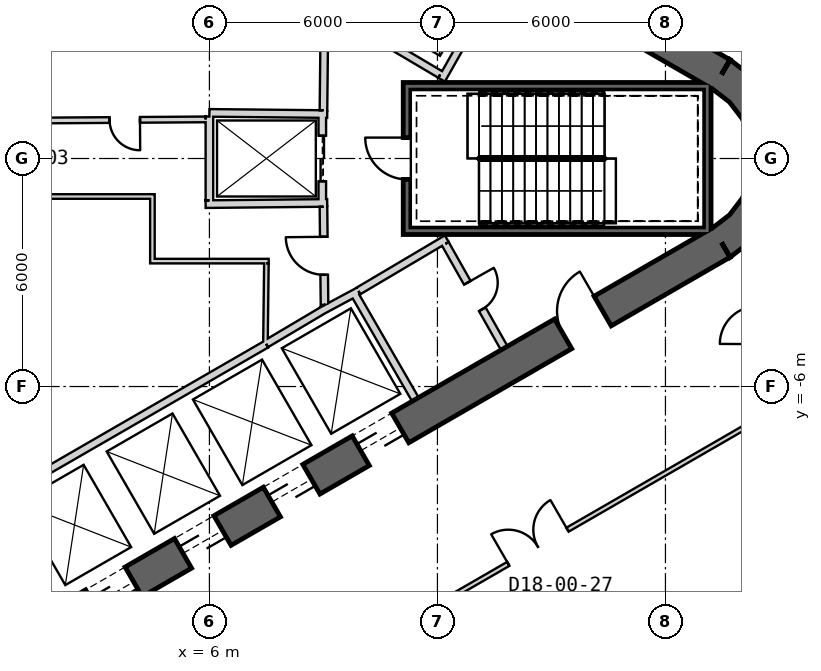
"""IFC4 building model, lengths in metres.
Left out: names, types, materials, properties, quantities, classifications, styles, units other than length and angle.
Written with IfcOpenShell. Run it as: python <this file> out.ifc"""

import sys

from ifc_helpers import new_model, si_unit, direction, frame, frame_2d, origin, place, context, subcontext, project, spatial, polyline, rectangle, outline, extrude, element, fill, save


model = new_model("IFC4")
c1 = context("Model", 3, precision=1e-05, world=origin(), true_north=direction((0.0, 1.0)))
c2 = subcontext(c1, "Body", "Model", "MODEL_VIEW")
j1 = project(units=[si_unit("LENGTHUNIT", "METRE"), si_unit("PLANEANGLEUNIT", "RADIAN")], contexts=[c1])
p1 = place(None, origin())
s1 = spatial("IfcSite", under=j1, at=p1, CompositionType="ELEMENT")
p2 = place(p1, origin())
s2 = spatial("IfcBuilding", under=s1, at=p2, CompositionType="ELEMENT")
p3 = place(p2, origin())
s3 = spatial("IfcBuildingStorey", under=s2, at=p3, CompositionType="ELEMENT", Elevation=0.0)
p4 = place(p3, frame((19.475, 2.208, 0.0), z_axis=(0.0, 0.0, 1.0), x_axis=(-0.866028369851, 0.499994862586, 0.0)))
e1 = element("IfcWall", 1, at=p4, inside=s3, PredefinedType="SHEAR", context=c2, shape_type="SweptSolid", body=[
    extrude(rectangle(XDim=31.523, YDim=0.9, at=frame_2d((15.762, 0.0))), origin(), (0.0, 0.0, 1.0), 9.0),
])
p5 = place(p4, frame((7.062, 0.0, 0.0)))
e2 = element("IfcOpeningElement", 2, at=p5, cuts=e1, PredefinedType="OPENING", context=c2, shape_type="SweptSolid", body=[
    extrude(rectangle(XDim=1.2, YDim=2.4, at=frame_2d((0.6, 1.2))), frame((0.0, 0.46, 0.0), z_axis=(0.0, -1.0, 0.0), x_axis=(1.0, 0.0, 0.0)), (0.0, 0.0, 1.0), 0.92),
])
p6 = place(p4, frame((9.762, 0.0, 0.0)))
e3 = element("IfcOpeningElement", 3, at=p6, cuts=e1, PredefinedType="OPENING", context=c2, shape_type="SweptSolid", body=[
    extrude(rectangle(XDim=1.2, YDim=2.4, at=frame_2d((0.6, 1.2))), frame((0.0, 0.46, 0.0), z_axis=(0.0, -1.0, 0.0), x_axis=(1.0, 0.0, 0.0)), (0.0, 0.0, 1.0), 0.92),
])
p7 = place(p4, frame((12.462, 0.0, 0.0)))
e4 = element("IfcOpeningElement", 4, at=p7, cuts=e1, PredefinedType="OPENING", context=c2, shape_type="SweptSolid", body=[
    extrude(rectangle(XDim=1.2, YDim=2.4, at=frame_2d((0.6, 1.2))), frame((0.0, 0.46, 0.0), z_axis=(0.0, -1.0, 0.0), x_axis=(1.0, 0.0, 0.0)), (0.0, 0.0, 1.0), 0.92),
])
p8 = place(p4, frame((15.162, 0.0, 0.0)))
e5 = element("IfcOpeningElement", 5, at=p8, cuts=e1, PredefinedType="OPENING", context=c2, shape_type="SweptSolid", body=[
    extrude(rectangle(XDim=1.2, YDim=2.4, at=frame_2d((0.6, 1.2))), frame((0.0, 0.46, 0.0), z_axis=(0.0, -1.0, 0.0), x_axis=(1.0, 0.0, 0.0)), (0.0, 0.0, 1.0), 0.92),
])
p9 = place(p4, frame((17.862, 0.0, 0.0)))
e6 = element("IfcOpeningElement", 6, at=p9, cuts=e1, PredefinedType="OPENING", context=c2, shape_type="SweptSolid", body=[
    extrude(rectangle(XDim=1.2, YDim=2.4, at=frame_2d((0.6, 1.2))), frame((0.0, 0.46, 0.0), z_axis=(0.0, -1.0, 0.0), x_axis=(1.0, 0.0, 0.0)), (0.0, 0.0, 1.0), 0.92),
])
p10 = place(p4, frame((20.562, 0.0, 0.0)))
e7 = element("IfcOpeningElement", 7, at=p10, cuts=e1, PredefinedType="OPENING", context=c2, shape_type="SweptSolid", body=[
    extrude(rectangle(XDim=1.2, YDim=2.4, at=frame_2d((0.6, 1.2))), frame((0.0, 0.46, 0.0), z_axis=(0.0, -1.0, 0.0), x_axis=(1.0, 0.0, 0.0)), (0.0, 0.0, 1.0), 0.92),
])
p11 = place(p4, frame((23.262, 0.0, 0.0)))
e8 = element("IfcOpeningElement", 8, at=p11, cuts=e1, PredefinedType="OPENING", context=c2, shape_type="SweptSolid", body=[
    extrude(rectangle(XDim=1.2, YDim=2.4, at=frame_2d((0.6, 1.2))), frame((0.0, 0.46, 0.0), z_axis=(0.0, -1.0, 0.0), x_axis=(1.0, 0.0, 0.0)), (0.0, 0.0, 1.0), 0.92),
])
p12 = place(p4, frame((3.612, 0.0, 0.0)))
e9 = element("IfcOpeningElement", 9, at=p12, cuts=e1, PredefinedType="OPENING", context=c2, shape_type="SweptSolid", body=[
    extrude(rectangle(XDim=1.2, YDim=2.4, at=frame_2d((0.6, 1.2))), frame((0.0, 0.46, 0.0), z_axis=(0.0, -1.0, 0.0), x_axis=(1.0, 0.0, 0.0)), (0.0, 0.0, 1.0), 0.92),
])
p13 = place(p4, frame((26.712, 0.0, 0.0)))
e10 = element("IfcOpeningElement", 10, at=p13, cuts=e1, PredefinedType="OPENING", context=c2, shape_type="SweptSolid", body=[
    extrude(rectangle(XDim=1.2, YDim=2.4, at=frame_2d((0.6, 1.2))), frame((0.0, 0.46, 0.0), z_axis=(0.0, -1.0, 0.0), x_axis=(1.0, 0.0, 0.0)), (0.0, 0.0, 1.0), 0.92),
])
p14 = place(p3, frame((-7.825, -17.97, 0.0), z_axis=(0.0, 0.0, 1.0), x_axis=(0.866028369851, 0.499994862586, 0.0)))
e11 = element("IfcWall", 11, at=p14, inside=s3, PredefinedType="SHEAR", context=c2, shape_type="SweptSolid", body=[
    extrude(rectangle(XDim=31.523, YDim=0.9, at=frame_2d((15.762, 0.0))), origin(), (0.0, 0.0, 1.0), 9.0),
])
p15 = place(p14, frame((7.062, 0.0, 0.0)))
e12 = element("IfcOpeningElement", 12, at=p15, cuts=e11, PredefinedType="OPENING", context=c2, shape_type="SweptSolid", body=[
    extrude(rectangle(XDim=1.2, YDim=2.4, at=frame_2d((0.6, 1.2))), frame((0.0, 0.46, 0.0), z_axis=(0.0, -1.0, 0.0), x_axis=(1.0, 0.0, 0.0)), (0.0, 0.0, 1.0), 0.92),
])
p16 = place(p14, frame((9.762, 0.0, 0.0)))
e13 = element("IfcOpeningElement", 13, at=p16, cuts=e11, PredefinedType="OPENING", context=c2, shape_type="SweptSolid", body=[
    extrude(rectangle(XDim=1.2, YDim=2.4, at=frame_2d((0.6, 1.2))), frame((0.0, 0.46, 0.0), z_axis=(0.0, -1.0, 0.0), x_axis=(1.0, 0.0, 0.0)), (0.0, 0.0, 1.0), 0.92),
])
p17 = place(p14, frame((12.462, 0.0, 0.0)))
e14 = element("IfcOpeningElement", 14, at=p17, cuts=e11, PredefinedType="OPENING", context=c2, shape_type="SweptSolid", body=[
    extrude(rectangle(XDim=1.2, YDim=2.4, at=frame_2d((0.6, 1.2))), frame((0.0, 0.46, 0.0), z_axis=(0.0, -1.0, 0.0), x_axis=(1.0, 0.0, 0.0)), (0.0, 0.0, 1.0), 0.92),
])
p18 = place(p14, frame((15.162, 0.0, 0.0)))
e15 = element("IfcOpeningElement", 15, at=p18, cuts=e11, PredefinedType="OPENING", context=c2, shape_type="SweptSolid", body=[
    extrude(rectangle(XDim=1.2, YDim=2.4, at=frame_2d((0.6, 1.2))), frame((0.0, 0.46, 0.0), z_axis=(0.0, -1.0, 0.0), x_axis=(1.0, 0.0, 0.0)), (0.0, 0.0, 1.0), 0.92),
])
p19 = place(p14, frame((17.862, 0.0, 0.0)))
e16 = element("IfcOpeningElement", 16, at=p19, cuts=e11, PredefinedType="OPENING", context=c2, shape_type="SweptSolid", body=[
    extrude(rectangle(XDim=1.2, YDim=2.4, at=frame_2d((0.6, 1.2))), frame((0.0, 0.46, 0.0), z_axis=(0.0, -1.0, 0.0), x_axis=(1.0, 0.0, 0.0)), (0.0, 0.0, 1.0), 0.92),
])
p20 = place(p14, frame((20.562, 0.0, 0.0)))
e17 = element("IfcOpeningElement", 17, at=p20, cuts=e11, PredefinedType="OPENING", context=c2, shape_type="SweptSolid", body=[
    extrude(rectangle(XDim=1.2, YDim=2.4, at=frame_2d((0.6, 1.2))), frame((0.0, 0.46, 0.0), z_axis=(0.0, -1.0, 0.0), x_axis=(1.0, 0.0, 0.0)), (0.0, 0.0, 1.0), 0.92),
])
p21 = place(p14, frame((26.712, 0.0, 0.0)))
e18 = element("IfcOpeningElement", 18, at=p21, cuts=e11, PredefinedType="OPENING", context=c2, shape_type="SweptSolid", body=[
    extrude(rectangle(XDim=1.2, YDim=2.4, at=frame_2d((0.6, 1.2))), frame((0.0, 0.46, 0.0), z_axis=(0.0, -1.0, 0.0), x_axis=(1.0, 0.0, 0.0)), (0.0, 0.0, 1.0), 0.92),
])
p22 = place(p14, frame((3.612, 0.0, 0.0)))
e19 = element("IfcOpeningElement", 19, at=p22, cuts=e11, PredefinedType="OPENING", context=c2, shape_type="SweptSolid", body=[
    extrude(rectangle(XDim=1.2, YDim=2.4, at=frame_2d((0.6, 1.2))), frame((0.0, 0.46, 0.0), z_axis=(0.0, -1.0, 0.0), x_axis=(1.0, 0.0, 0.0)), (0.0, 0.0, 1.0), 0.92),
])
p23 = place(p3, origin())
e20 = element("IfcWall", 20, at=p23, inside=s3, PredefinedType="SHEAR", context=c2, shape_type="SweptSolid", body=[
    extrude(outline(polyline([(19.7, -2.598), (20.321, -2.121), (20.798, -1.5), (21.098, -0.777), (21.2, 0.0), (21.098, 0.777), (20.798, 1.5), (20.321, 2.121), (19.7, 2.598), (19.25, 1.819), (19.685, 1.485), (20.019, 1.05), (20.229, 0.543), (20.3, 0.0), (20.229, -0.543), (20.019, -1.05), (19.685, -1.485), (19.25, -1.819), (19.7, -2.598)])), origin(), (0.0, 0.0, 1.0), 9.0),
])
p24 = place(p3, frame((12.11, 2.073, 0.0), z_axis=(0.0, 0.0, 1.0), x_axis=(0.49196600604, 0.870614408852, 0.0)))
e21 = element("IfcWall", 21, at=p24, inside=s3, PredefinedType="PLUMBINGWALL", context=c2, shape_type="SweptSolid", body=[
    extrude(rectangle(XDim=3.35, YDim=0.2, at=frame_2d((1.675, 0.0))), origin(), (0.0, 0.0, 1.0), 8.7),
])
p25 = place(p3, frame((12.073, 2.211, 0.0), z_axis=(0.0, 0.0, 1.0), x_axis=(-0.860438357912, 0.509554542943, 0.0)))
e22 = element("IfcWall", 22, at=p25, inside=s3, PredefinedType="PLUMBINGWALL", context=c2, shape_type="SweptSolid", body=[
    extrude(rectangle(XDim=2.7, YDim=0.2, at=frame_2d((1.35, 0.0))), origin(), (0.0, 0.0, 1.0), 8.7),
])
p26 = place(p3, frame((0.483, -8.936, 0.0), z_axis=(0.0, 0.0, 1.0), x_axis=(0.866030989016, 0.499990325971, 0.0)))
e23 = element("IfcWall", 23, at=p26, inside=s3, PredefinedType="PLUMBINGWALL", context=c2, shape_type="SweptSolid", body=[
    extrude(rectangle(XDim=8.1, YDim=0.2, at=frame_2d((4.05, 0.0))), origin(), (0.0, 0.0, 1.0), 8.7),
])
p27 = place(p3, frame((9.795, -3.525, 0.0), z_axis=(0.0, 0.0, 1.0), x_axis=(0.499984717929, -0.866034226713, 0.0)))
e24 = element("IfcWall", 24, at=p27, inside=s3, PredefinedType="PLUMBINGWALL", context=c2, shape_type="SweptSolid", body=[
    extrude(rectangle(XDim=3.25, YDim=0.2, at=frame_2d((1.625, 0.0))), origin(), (0.0, 0.0, 1.0), 8.7),
])
p28 = place(p3, frame((8.974, -3.999, 0.0), z_axis=(0.0, 0.0, 1.0), x_axis=(0.880907015104, 0.473289373154, 0.0)))
e25 = element("IfcWall", 25, at=p28, inside=s3, PredefinedType="PLUMBINGWALL", context=c2, shape_type="SweptSolid", body=[
    extrude(rectangle(XDim=1.078, YDim=0.2, at=frame_2d((0.539, 0.0))), origin(), (0.0, 0.0, 1.0), 8.7),
])
p29 = place(p3, frame((7.493, -4.878, 0.0), z_axis=(0.0, 0.0, 1.0), x_axis=(0.859981807212, 0.510324691999, 0.0)))
e26 = element("IfcWall", 26, at=p29, inside=s3, PredefinedType="PLUMBINGWALL", context=c2, shape_type="SweptSolid", body=[
    extrude(rectangle(XDim=1.845, YDim=0.2, at=frame_2d((0.922, 0.0))), origin(), (0.0, 0.0, 1.0), 8.7),
])
p30 = place(p3, frame((19.2, 1.9, -0.4), z_axis=(0.0, 0.0, 1.0), x_axis=(-1.0, 0.0, 0.0)))
e27 = element("IfcWall", 27, at=p30, inside=s3, PredefinedType="SHEAR", context=c2, shape_type="SweptSolid", body=[
    extrude(rectangle(XDim=8.1, YDim=0.2, at=frame_2d((4.05, 0.0))), origin(), (0.0, 0.0, 1.0), 9.1),
])
p31 = place(p3, frame((19.1, -2.0, -0.4), z_axis=(0.0, 0.0, 1.0), x_axis=(0.0, 1.0, 0.0)))
e28 = element("IfcWall", 28, at=p31, inside=s3, PredefinedType="SHEAR", context=c2, shape_type="SweptSolid", body=[
    extrude(rectangle(XDim=3.8, YDim=0.2, at=frame_2d((1.9, 0.0))), origin(), (0.0, 0.0, 1.0), 9.1),
])
p32 = place(p3, frame((11.1, -1.9, -0.4), z_axis=(0.0, 0.0, 1.0), x_axis=(1.0, 0.0, 0.0)))
e29 = element("IfcWall", 29, at=p32, inside=s3, PredefinedType="SHEAR", context=c2, shape_type="SweptSolid", body=[
    extrude(rectangle(XDim=7.9, YDim=0.2, at=frame_2d((3.95, 0.0))), origin(), (0.0, 0.0, 1.0), 9.1),
])
p33 = place(p3, frame((11.2, -1.8, -0.4), z_axis=(0.0, 0.0, 1.0), x_axis=(0.0, 1.0, 0.0)))
e30 = element("IfcWall", 30, at=p33, inside=s3, PredefinedType="SHEAR", context=c2, shape_type="SweptSolid", body=[
    extrude(rectangle(XDim=3.6, YDim=0.2, at=frame_2d((1.8, 0.0))), origin(), (0.0, 0.0, 1.0), 9.1),
])
p34 = place(p33, frame((1.25, 0.0, 0.4)))
e31 = element("IfcOpeningElement", 31, at=p34, cuts=e30, PredefinedType="OPENING", context=c2, shape_type="SweptSolid", body=[
    extrude(rectangle(XDim=1.1, YDim=2.1, at=frame_2d((0.55, 1.05))), frame((0.0, 0.11, 0.0), z_axis=(0.0, -1.0, 0.0), x_axis=(1.0, 0.0, 0.0)), (0.0, 0.0, 1.0), 0.22),
])
p35 = place(p3, frame((8.97, 1.2, 0.0), z_axis=(0.0, 0.0, 1.0), x_axis=(0.0, -1.0, 0.0)))
e32 = element("IfcWall", 32, at=p35, inside=s3, PredefinedType="PLUMBINGWALL", context=c2, shape_type="SweptSolid", body=[
    extrude(rectangle(XDim=2.4, YDim=0.2, at=frame_2d((1.2, 0.0))), origin(), (0.0, 0.0, 1.0), 8.7),
])
p36 = place(p35, frame((0.6, 0.0, 0.0)))
e33 = element("IfcOpeningElement", 33, at=p36, cuts=e32, PredefinedType="OPENING", context=c2, shape_type="SweptSolid", body=[
    extrude(rectangle(XDim=1.2, YDim=2.4, at=frame_2d((0.6, 1.2))), frame((0.0, 0.11, 0.0), z_axis=(0.0, -1.0, 0.0), x_axis=(1.0, 0.0, 0.0)), (0.0, 0.0, 1.0), 0.22),
])
p37 = place(p3, frame((6.0, 1.2, 0.0), z_axis=(0.0, 0.0, 1.0), x_axis=(0.999949988, -0.010001074852, 0.0)))
e34 = element("IfcWall", 34, at=p37, inside=s3, PredefinedType="PLUMBINGWALL", context=c2, shape_type="SweptSolid", body=[
    extrude(rectangle(XDim=3.1, YDim=0.2, at=frame_2d((1.55, 0.0))), origin(), (0.0, 0.0, 1.0), 8.7),
])
p38 = place(p3, frame((5.9, -1.201, 0.0), z_axis=(0.0, 0.0, 1.0), x_axis=(0.999950064753, 0.009993397809, 0.0)))
e35 = element("IfcWall", 35, at=p38, inside=s3, PredefinedType="PLUMBINGWALL", context=c2, shape_type="SweptSolid", body=[
    extrude(rectangle(XDim=3.2, YDim=0.2, at=frame_2d((1.6, 0.0))), origin(), (0.0, 0.0, 1.0), 8.7),
])
p39 = place(p3, frame((6.0, -1.1, 0.0), z_axis=(0.0, 0.0, 1.0), x_axis=(0.0, 1.0, 0.0)))
e36 = element("IfcWall", 36, at=p39, inside=s3, PredefinedType="PLUMBINGWALL", context=c2, shape_type="SweptSolid", body=[
    extrude(rectangle(XDim=2.205, YDim=0.2, at=frame_2d((1.102, 0.0))), origin(), (0.0, 0.0, 1.0), 8.7),
])
p40 = place(p3, frame((12.245, -2.109, 0.0), z_axis=(0.0, 0.0, 1.0), x_axis=(-0.860414880418, -0.509594185166, 0.0)))
e37 = element("IfcWall", 37, at=p40, inside=s3, PredefinedType="PARTITIONING", context=c2, shape_type="SweptSolid", body=[
    extrude(rectangle(XDim=2.7, YDim=0.2, at=frame_2d((1.35, 0.0))), origin(), (0.0, 0.0, 1.0), 8.7),
])
p41 = place(p3, frame((13.758, -4.99, 0.0), z_axis=(0.0, 0.0, 1.0), x_axis=(-0.491993409184, 0.87059892334, 0.0)))
e38 = element("IfcWall", 38, at=p41, inside=s3, PredefinedType="PARTITIONING", context=c2, shape_type="SweptSolid", body=[
    extrude(rectangle(XDim=3.15, YDim=0.2, at=frame_2d((1.575, 0.0))), origin(), (0.0, 0.0, 1.0), 8.7),
])
p42 = place(p41, frame((1.175, 0.0, 0.0)))
e39 = element("IfcOpeningElement", 39, at=p42, cuts=e38, PredefinedType="OPENING", context=c2, shape_type="SweptSolid", body=[
    extrude(rectangle(XDim=0.8, YDim=2.1, at=frame_2d((0.4, 1.05))), frame((0.0, 0.11, 0.0), z_axis=(0.0, -1.0, 0.0), x_axis=(1.0, 0.0, 0.0)), (0.0, 0.0, 1.0), 0.22),
])
p43 = place(p3, frame((9.001, 1.27, 0.0), z_axis=(0.0, 0.0, 1.0), x_axis=(0.010784614026, 0.999941844359, 0.0)))
e40 = element("IfcWall", 40, at=p43, inside=s3, PredefinedType="PARTITIONING", context=c2, shape_type="SweptSolid", body=[
    extrude(rectangle(XDim=2.581, YDim=0.2, at=frame_2d((1.291, 0.0))), origin(), (0.0, 0.0, 1.0), 8.7),
])
p44 = place(p3, frame((9.029, -3.851, 0.0), z_axis=(0.0, 0.0, 1.0), x_axis=(-0.010783593937, 0.99994185536, 0.0)))
e41 = element("IfcWall", 41, at=p44, inside=s3, PredefinedType="PARTITIONING", context=c2, shape_type="SweptSolid", body=[
    extrude(rectangle(XDim=2.581, YDim=0.2, at=frame_2d((1.291, 0.0))), origin(), (0.0, 0.0, 1.0), 8.7),
])
p45 = place(p44, frame((0.791, 0.0, 0.0)))
e42 = element("IfcOpeningElement", 42, at=p45, cuts=e41, PredefinedType="OPENING", context=c2, shape_type="SweptSolid", body=[
    extrude(rectangle(XDim=1.0, YDim=2.1, at=frame_2d((0.5, 1.05))), frame((0.0, 0.11, 0.0), z_axis=(0.0, -1.0, 0.0), x_axis=(1.0, 0.0, 0.0)), (0.0, 0.0, 1.0), 0.22),
])
p46 = place(p3, frame((1.518, 0.999, 0.0), z_axis=(0.0, 0.0, 1.0), x_axis=(0.999976903524, 0.006796500403, 0.0)))
e43 = element("IfcWall", 43, at=p46, inside=s3, PredefinedType="PLUMBINGWALL", context=c2, shape_type="SweptSolid", body=[
    extrude(rectangle(XDim=4.382, YDim=0.15, at=frame_2d((2.191, 0.0))), origin(), (0.0, 0.0, 1.0), 8.7),
])
p47 = place(p46, frame((1.855, 0.0, 0.0)))
e44 = element("IfcOpeningElement", 44, at=p47, cuts=e43, PredefinedType="OPENING", context=c2, shape_type="SweptSolid", body=[
    extrude(rectangle(XDim=0.8, YDim=2.1, at=frame_2d((0.4, 1.05))), frame((0.0, 0.085, 0.0), z_axis=(0.0, -1.0, 0.0), x_axis=(1.0, 0.0, 0.0)), (0.0, 0.0, 1.0), 0.17),
])
p48 = place(p3, frame((4.56, -1.0, 0.0), z_axis=(0.0, 0.0, 1.0), x_axis=(-1.0, 0.0, 0.0)))
e45 = element("IfcWall", 45, at=p48, inside=s3, PredefinedType="PARTITIONING", context=c2, shape_type="SweptSolid", body=[
    extrude(rectangle(XDim=2.896, YDim=0.12, at=frame_2d((1.448, 0.0))), origin(), (0.0, 0.0, 1.0), 8.7),
])
p49 = place(p3, frame((4.5, -2.76, 0.0), z_axis=(0.0, 0.0, 1.0), x_axis=(0.0, 1.0, 0.0)))
e46 = element("IfcWall", 46, at=p49, inside=s3, PredefinedType="PARTITIONING", context=c2, shape_type="SweptSolid", body=[
    extrude(rectangle(XDim=1.7, YDim=0.12, at=frame_2d((0.85, 0.0))), origin(), (0.0, 0.0, 1.0), 8.7),
])
p50 = place(p3, frame((7.56, -2.7, 0.0), z_axis=(0.0, 0.0, 1.0), x_axis=(-1.0, 0.0, 0.0)))
e47 = element("IfcWall", 47, at=p50, inside=s3, PredefinedType="PARTITIONING", context=c2, shape_type="SweptSolid", body=[
    extrude(rectangle(XDim=3.0, YDim=0.12, at=frame_2d((1.5, 0.0))), origin(), (0.0, 0.0, 1.0), 8.7),
])
p51 = place(p3, frame((7.475, -4.865, 0.0), z_axis=(0.0, 0.0, 1.0), x_axis=(0.011716133148, 0.999931363757, 0.0)))
e48 = element("IfcWall", 48, at=p51, inside=s3, PredefinedType="PARTITIONING", context=c2, shape_type="SweptSolid", body=[
    extrude(rectangle(XDim=2.105, YDim=0.12, at=frame_2d((1.052, 0.0))), origin(), (0.0, 0.0, 1.0), 8.7),
])
p52 = place(p3, frame((-4.276, -21.14, 0.0), z_axis=(0.0, 0.0, 1.0), x_axis=(0.866026219638, 0.499998586897, 0.0)))
e49 = element("IfcWall", 49, at=p52, inside=s3, PredefinedType="PARTITIONING", context=c2, shape_type="SweptSolid", body=[
    extrude(rectangle(XDim=28.547, YDim=0.12, at=frame_2d((14.273, 0.0))), origin(), (0.0, 0.0, 1.0), 8.7),
])
p53 = place(p52, frame((20.947, 0.0, 0.0)))
e50 = element("IfcOpeningElement", 50, at=p53, cuts=e49, PredefinedType="OPENING", context=c2, shape_type="SweptSolid", body=[
    extrude(rectangle(XDim=1.8, YDim=2.1, at=frame_2d((0.9, 1.05))), frame((0.0, 0.07, 0.0), z_axis=(0.0, -1.0, 0.0), x_axis=(1.0, 0.0, 0.0)), (0.0, 0.0, 1.0), 0.14),
])
p54 = place(p52, frame((13.347, 0.0, 0.0)))
e51 = element("IfcOpeningElement", 51, at=p54, cuts=e49, PredefinedType="OPENING", context=c2, shape_type="SweptSolid", body=[
    extrude(rectangle(XDim=1.8, YDim=2.1, at=frame_2d((0.9, 1.05))), frame((0.0, 0.07, 0.0), z_axis=(0.0, -1.0, 0.0), x_axis=(1.0, 0.0, 0.0)), (0.0, 0.0, 1.0), 0.14),
])
p55 = place(p52, frame((5.747, 0.0, 0.0)))
e52 = element("IfcOpeningElement", 52, at=p55, cuts=e49, PredefinedType="OPENING", context=c2, shape_type="SweptSolid", body=[
    extrude(rectangle(XDim=1.8, YDim=2.1, at=frame_2d((0.9, 1.05))), frame((0.0, 0.07, 0.0), z_axis=(0.0, -1.0, 0.0), x_axis=(1.0, 0.0, 0.0)), (0.0, 0.0, 1.0), 0.14),
])
p56 = place(p34, origin())
e53 = element("IfcDoor", 53, at=p56, inside=s3, OperationType="SINGLE_SWING_RIGHT", PredefinedType="USERDEFINED", context=c2, shape_type="SweptSolid", body=[
    extrude(rectangle(XDim=1.1, YDim=2.1, at=frame_2d((0.55, 1.05))), frame((0.0, 0.025, 0.0), z_axis=(0.0, -1.0, 0.0), x_axis=(1.0, 0.0, 0.0)), (0.0, 0.0, 1.0), 0.05),
])
fill(e31, e53)
p57 = place(p45, origin())
e54 = element("IfcDoor", 54, at=p57, inside=s3, OperationType="SINGLE_SWING_RIGHT", PredefinedType="USERDEFINED", context=c2, shape_type="SweptSolid", body=[
    extrude(rectangle(XDim=1.0, YDim=2.1, at=frame_2d((0.5, 1.05))), frame((0.0, 0.025, 0.0), z_axis=(0.0, -1.0, 0.0), x_axis=(1.0, 0.0, 0.0)), (0.0, 0.0, 1.0), 0.05),
])
fill(e42, e54)
p58 = place(p36, origin())
e55 = element("IfcDoor", 55, at=p58, inside=s3, OperationType="SLIDING_TO_LEFT", PredefinedType="USERDEFINED", context=c2, shape_type="SweptSolid", body=[
    extrude(rectangle(XDim=1.2, YDim=2.4, at=frame_2d((0.6, 1.2))), frame((0.0, 0.025, 0.0), z_axis=(0.0, -1.0, 0.0), x_axis=(1.0, 0.0, 0.0)), (0.0, 0.0, 1.0), 0.05),
])
fill(e33, e55)
p59 = place(p47, origin())
e56 = element("IfcDoor", 56, at=p59, inside=s3, OperationType="SINGLE_SWING_RIGHT", PredefinedType="USERDEFINED", context=c2, shape_type="SweptSolid", body=[
    extrude(rectangle(XDim=0.8, YDim=2.1, at=frame_2d((0.4, 1.05))), frame((0.0, 0.025, 0.0), z_axis=(0.0, -1.0, 0.0), x_axis=(1.0, 0.0, 0.0)), (0.0, 0.0, 1.0), 0.05),
])
fill(e44, e56)
p60 = place(p42, origin())
e57 = element("IfcDoor", 57, at=p60, inside=s3, OperationType="SINGLE_SWING_RIGHT", PredefinedType="USERDEFINED", context=c2, shape_type="SweptSolid", body=[
    extrude(rectangle(XDim=0.8, YDim=2.1, at=frame_2d((0.4, 1.05))), frame((0.0, 0.025, 0.0), z_axis=(0.0, -1.0, 0.0), x_axis=(1.0, 0.0, 0.0)), (0.0, 0.0, 1.0), 0.05),
])
fill(e39, e57)
p61 = place(p53, origin())
e58 = element("IfcDoor", 58, at=p61, inside=s3, OperationType="DOUBLE_DOOR_SINGLE_SWING", PredefinedType="NOTDEFINED", context=c2, shape_type="SweptSolid", body=[
    extrude(rectangle(XDim=1.8, YDim=2.1, at=frame_2d((0.9, 1.05))), frame((0.0, 0.025, 0.0), z_axis=(0.0, -1.0, 0.0), x_axis=(1.0, 0.0, 0.0)), (0.0, 0.0, 1.0), 0.05),
])
fill(e50, e58)
p62 = place(p17, origin())
e59 = element("IfcDoor", 59, at=p62, inside=s3, OperationType="SLIDING_TO_LEFT", PredefinedType="USERDEFINED", context=c2, shape_type="SweptSolid", body=[
    extrude(rectangle(XDim=1.2, YDim=2.4, at=frame_2d((0.6, 1.2))), frame((0.0, 0.025, 0.0), z_axis=(0.0, -1.0, 0.0), x_axis=(1.0, 0.0, 0.0)), (0.0, 0.0, 1.0), 0.05),
])
fill(e14, e59)
p63 = place(p18, origin())
e60 = element("IfcDoor", 60, at=p63, inside=s3, OperationType="SLIDING_TO_LEFT", PredefinedType="USERDEFINED", context=c2, shape_type="SweptSolid", body=[
    extrude(rectangle(XDim=1.2, YDim=2.4, at=frame_2d((0.6, 1.2))), frame((0.0, 0.025, 0.0), z_axis=(0.0, -1.0, 0.0), x_axis=(1.0, 0.0, 0.0)), (0.0, 0.0, 1.0), 0.05),
])
fill(e15, e60)
p64 = place(p19, origin())
e61 = element("IfcDoor", 61, at=p64, inside=s3, OperationType="SLIDING_TO_LEFT", PredefinedType="USERDEFINED", context=c2, shape_type="SweptSolid", body=[
    extrude(rectangle(XDim=1.2, YDim=2.4, at=frame_2d((0.6, 1.2))), frame((0.0, 0.025, 0.0), z_axis=(0.0, -1.0, 0.0), x_axis=(1.0, 0.0, 0.0)), (0.0, 0.0, 1.0), 0.05),
])
fill(e16, e61)
p65 = place(p20, origin())
e62 = element("IfcDoor", 62, at=p65, inside=s3, OperationType="SLIDING_TO_LEFT", PredefinedType="USERDEFINED", context=c2, shape_type="SweptSolid", body=[
    extrude(rectangle(XDim=1.2, YDim=2.4, at=frame_2d((0.6, 1.2))), frame((0.0, 0.025, 0.0), z_axis=(0.0, -1.0, 0.0), x_axis=(1.0, 0.0, 0.0)), (0.0, 0.0, 1.0), 0.05),
])
fill(e17, e62)
p66 = place(p21, origin())
e63 = element("IfcDoor", 63, at=p66, inside=s3, OperationType="SINGLE_SWING_RIGHT", PredefinedType="USERDEFINED", context=c2, shape_type="SweptSolid", body=[
    extrude(rectangle(XDim=1.2, YDim=2.4, at=frame_2d((0.6, 1.2))), frame((0.0, 0.025, 0.0), z_axis=(0.0, -1.0, 0.0), x_axis=(1.0, 0.0, 0.0)), (0.0, 0.0, 1.0), 0.05),
])
fill(e18, e63)
save(model, sys.argv[1])
